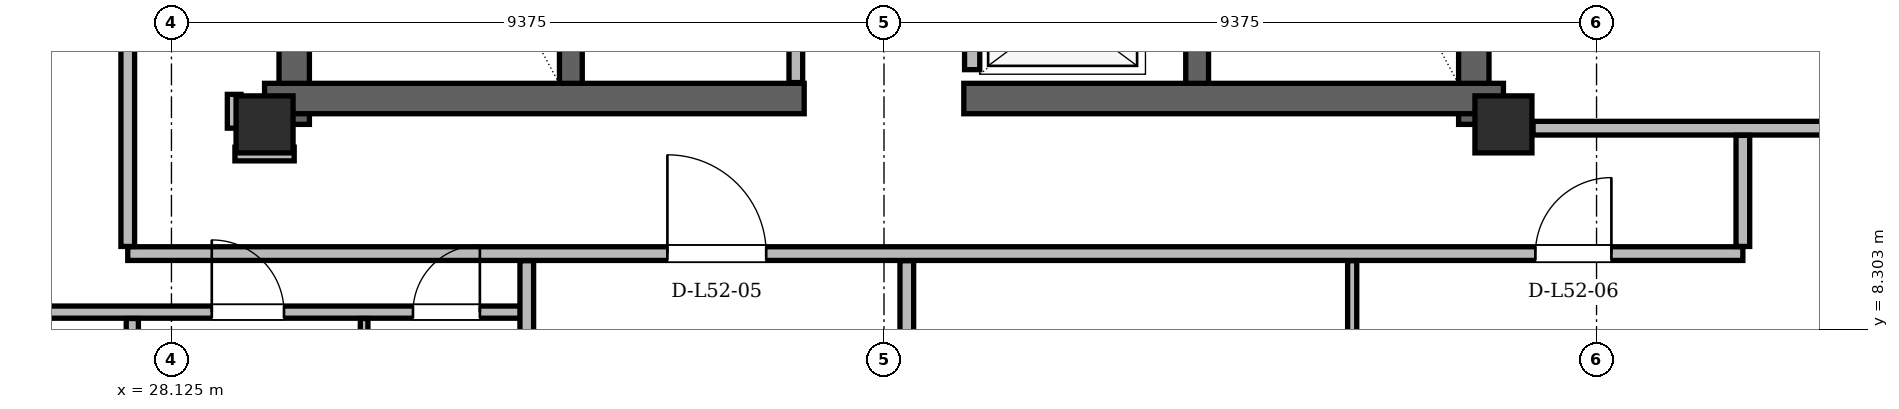
"""IFC4 building model, lengths in metres.
Left out: names, types, materials, properties, quantities, classifications, styles, units other than length and angle.
Written with IfcOpenShell. Run it as: python <this file> out.ifc"""

import sys

from ifc_helpers import new_model, si_unit, direction, frame, frame_2d, origin, origin_2d, place, context, subcontext, project, spatial, rectangle, hollow_rectangle, extrude, element, fill, save


model = new_model("IFC4")
c1 = context("Model", 3, precision=1e-05, world=origin(), true_north=direction((0.0, 1.0)))
c2 = subcontext(c1, "Body", "Model", "MODEL_VIEW")
j1 = project(units=[si_unit("LENGTHUNIT", "METRE"), si_unit("PLANEANGLEUNIT", "RADIAN")], contexts=[c1])
p1 = place(None, origin())
s1 = spatial("IfcSite", under=j1, at=p1, CompositionType="ELEMENT")
p2 = place(p1, origin())
s2 = spatial("IfcBuilding", under=s1, at=p2, CompositionType="ELEMENT")
p3 = place(p2, frame((0.0, 0.0, 197.4)))
s3 = spatial("IfcBuildingStorey", under=s2, at=p3, CompositionType="ELEMENT", Elevation=197.4)
for number, where, z_axis, x_axis in (
    (1, (29.35, 11.0, 0.0), (0.0, 0.0, 1.0), (1.0, 0.0, 0.0)),
    (2, (45.65, 11.0, 0.0), (0.0, 0.0, 1.0), (1.0, 0.0, 0.0)),
):
    element("IfcColumn", number, at=place(p3, frame(where, z_axis=z_axis, x_axis=x_axis)), inside=s3, PredefinedType="COLUMN", context=c2, shape_type="SweptSolid", body=[
        extrude(hollow_rectangle(XDim=0.75, YDim=0.75, WallThickness=0.06, at=origin_2d()), origin(), (0.0, 0.0, 1.0), 3.6),
    ])
for number, where, z_axis, x_axis in (
    (3, (29.74, 11.0, 0.0), (0.0, 0.0, 1.0), (0.0, 1.0, 0.0)),
    (4, (45.26, 11.0, 0.0), (0.0, 0.0, 1.0), (0.0, 1.0, 0.0)),
):
    element("IfcWall", number, at=place(p3, frame(where, z_axis=z_axis, x_axis=x_axis)), inside=s3, PredefinedType="SHEAR", context=c2, shape_type="SweptSolid", body=[
        extrude(rectangle(XDim=13.3, YDim=0.4, at=frame_2d((6.65, 0.0))), origin(), (0.0, 0.0, 1.0), 3.38),
    ])
for number, where, z_axis, x_axis in (
    (5, (29.35, 11.34, 0.0), (0.0, 0.0, 1.0), (1.0, 0.0, 0.0)),
    (6, (38.55, 11.34, 0.0), (0.0, 0.0, 1.0), (1.0, 0.0, 0.0)),
):
    element("IfcWall", number, at=place(p3, frame(where, z_axis=z_axis, x_axis=x_axis)), inside=s3, PredefinedType="SHEAR", context=c2, shape_type="SweptSolid", body=[
        extrude(rectangle(XDim=7.1, YDim=0.4, at=frame_2d((3.55, 0.0))), origin(), (0.0, 0.0, 1.0), 3.38),
    ])
for number, where, z_axis, x_axis in (
    (7, (33.38, 11.54, 0.0), (0.0, 0.0, 1.0), (0.0, 1.0, 0.0)),
    (8, (41.62, 11.54, 0.0), (0.0, 0.0, 1.0), (0.0, 1.0, 0.0)),
):
    element("IfcWall", number, at=place(p3, frame(where, z_axis=z_axis, x_axis=x_axis)), inside=s3, PredefinedType="SHEAR", context=c2, shape_type="SweptSolid", body=[
        extrude(rectangle(XDim=7.62, YDim=0.3, at=frame_2d((3.81, 0.0))), origin(), (0.0, 0.0, 1.0), 3.38),
    ])
p4 = place(p3, frame((33.766, 43.21, 0.0), z_axis=(0.0, 0.0, 1.0), x_axis=(-0.499998847915, -0.86602606894, 0.0)))
e9 = element("IfcWall", 9, at=p4, inside=s3, PredefinedType="SOLIDWALL", context=c2, shape_type="SweptSolid", body=[
    extrude(rectangle(XDim=36.293, YDim=0.29, at=frame_2d((18.147, 0.0))), origin(), (0.0, 0.0, 1.0), 2.677),
])
p5 = place(p4, frame((8.034, 0.0, 0.0)))
e10 = element("IfcOpeningElement", 10, at=p5, cuts=e9, PredefinedType="OPENING", context=c2, shape_type="SweptSolid", body=[
    extrude(rectangle(XDim=1.5, YDim=2.2, at=frame_2d((0.75, 1.1))), frame((0.0, 0.145, 0.0), z_axis=(0.0, -1.0, 0.0), x_axis=(1.0, 0.0, 0.0)), (0.0, 0.0, 1.0), 0.29),
])
p6 = place(p4, frame((28.214, 0.0, 0.0)))
e11 = element("IfcOpeningElement", 11, at=p6, cuts=e9, PredefinedType="OPENING", context=c2, shape_type="SweptSolid", body=[
    extrude(rectangle(XDim=1.5, YDim=2.2, at=frame_2d((0.75, 1.1))), frame((0.0, 0.145, 0.0), z_axis=(0.0, -1.0, 0.0), x_axis=(1.0, 0.0, 0.0)), (0.0, 0.0, 1.0), 0.29),
])
p7 = place(p4, frame((32.772, 0.0, 0.85)))
e12 = element("IfcOpeningElement", 12, at=p7, cuts=e9, PredefinedType="OPENING", context=c2, shape_type="SweptSolid", body=[
    extrude(rectangle(XDim=2.4, YDim=1.717, at=frame_2d((1.2, 0.858))), frame((0.0, 0.145, 0.0), z_axis=(0.0, -1.0, 0.0), x_axis=(1.0, 0.0, 0.0)), (0.0, 0.0, 1.0), 0.29),
])
p8 = place(p4, frame((21.96, 0.0, 0.85)))
e13 = element("IfcOpeningElement", 13, at=p8, cuts=e9, PredefinedType="OPENING", context=c2, shape_type="SweptSolid", body=[
    extrude(rectangle(XDim=2.0, YDim=1.717, at=frame_2d((1.0, 0.858))), frame((0.0, 0.145, 0.0), z_axis=(0.0, -1.0, 0.0), x_axis=(1.0, 0.0, 0.0)), (0.0, 0.0, 1.0), 0.29),
])
p9 = place(p4, frame((2.382, 0.0, 0.85)))
e14 = element("IfcOpeningElement", 14, at=p9, cuts=e9, PredefinedType="OPENING", context=c2, shape_type="SweptSolid", body=[
    extrude(rectangle(XDim=1.6, YDim=1.7, at=frame_2d((0.8, 0.85))), frame((0.0, 0.145, 0.0), z_axis=(0.0, -1.0, 0.0), x_axis=(1.0, 0.0, 0.0)), (0.0, 0.0, 1.0), 0.29),
])
p10 = place(p4, frame((13.34, 0.0, 0.85)))
e15 = element("IfcOpeningElement", 15, at=p10, cuts=e9, PredefinedType="OPENING", context=c2, shape_type="SweptSolid", body=[
    extrude(rectangle(XDim=3.0, YDim=1.717, at=frame_2d((1.5, 0.858))), frame((0.0, 0.145, 0.0), z_axis=(0.0, -1.0, 0.0), x_axis=(1.0, 0.0, 0.0)), (0.0, 0.0, 1.0), 0.29),
])
p11 = place(p3, frame((36.34, 11.55, 0.0), z_axis=(0.0, 0.0, 1.0), x_axis=(0.0, 1.0, 0.0)))
e16 = element("IfcWall", 16, at=p11, inside=s3, PredefinedType="PARTITIONING", context=c2, shape_type="SweptSolid", body=[
    extrude(rectangle(XDim=5.55, YDim=0.18, at=frame_2d((2.775, 0.0))), origin(), (0.0, 0.0, 1.0), 3.38),
])
p12 = place(p11, frame((2.85, 0.0, 0.0)))
e17 = element("IfcOpeningElement", 17, at=p12, cuts=e16, PredefinedType="OPENING", context=c2, shape_type="SweptSolid", body=[
    extrude(rectangle(XDim=0.95, YDim=2.1, at=frame_2d((0.475, 1.05))), frame((0.0, 0.09, 0.0), z_axis=(0.0, -1.0, 0.0), x_axis=(1.0, 0.0, 0.0)), (0.0, 0.0, 1.0), 0.18),
])
p13 = place(p3, frame((38.66, 11.72, 0.0), z_axis=(0.0, 0.0, 1.0), x_axis=(0.0, 1.0, 0.0)))
e18 = element("IfcWall", 18, at=p13, inside=s3, PredefinedType="PARTITIONING", context=c2, shape_type="SweptSolid", body=[
    extrude(rectangle(XDim=9.1, YDim=0.2, at=frame_2d((4.55, 0.0))), origin(), (0.0, 0.0, 1.0), 3.38),
])
p14 = place(p13, frame((0.255, 0.0, 0.0)))
e19 = element("IfcOpeningElement", 19, at=p14, cuts=e18, PredefinedType="OPENING", context=c2, shape_type="SweptSolid", body=[
    extrude(rectangle(XDim=1.05, YDim=2.15, at=frame_2d((0.525, 1.075))), frame((0.0, 0.1, 0.0), z_axis=(0.0, -1.0, 0.0), x_axis=(1.0, 0.0, 0.0)), (0.0, 0.0, 1.0), 0.2),
])
p15 = place(p13, frame((2.105, 0.0, 0.0)))
e20 = element("IfcOpeningElement", 20, at=p15, cuts=e18, PredefinedType="OPENING", context=c2, shape_type="SweptSolid", body=[
    extrude(rectangle(XDim=1.05, YDim=2.15, at=frame_2d((0.525, 1.075))), frame((0.0, 0.1, 0.0), z_axis=(0.0, -1.0, 0.0), x_axis=(1.0, 0.0, 0.0)), (0.0, 0.0, 1.0), 0.2),
])
p16 = place(p13, frame((3.955, 0.0, 0.0)))
e21 = element("IfcOpeningElement", 21, at=p16, cuts=e18, PredefinedType="OPENING", context=c2, shape_type="SweptSolid", body=[
    extrude(rectangle(XDim=1.05, YDim=2.15, at=frame_2d((0.525, 1.075))), frame((0.0, 0.1, 0.0), z_axis=(0.0, -1.0, 0.0), x_axis=(1.0, 0.0, 0.0)), (0.0, 0.0, 1.0), 0.2),
])
p17 = place(p3, frame((17.667, 8.53, 0.0), z_axis=(0.0, 0.0, 1.0), x_axis=(1.0, 0.0, 0.0)))
e22 = element("IfcWall", 22, at=p17, inside=s3, PredefinedType="PARTITIONING", context=c2, shape_type="SweptSolid", body=[
    extrude(rectangle(XDim=15.183, YDim=0.16, at=frame_2d((7.592, 0.0))), origin(), (0.0, 0.0, 1.0), 2.913),
])
p18 = place(p17, frame((2.401, 0.0, 0.0)))
e23 = element("IfcOpeningElement", 23, at=p18, cuts=e22, PredefinedType="OPENING", context=c2, shape_type="SweptSolid", body=[
    extrude(rectangle(XDim=0.92, YDim=2.12, at=frame_2d((0.46, 1.06))), frame((0.0, 0.08, 0.0), z_axis=(0.0, -1.0, 0.0), x_axis=(1.0, 0.0, 0.0)), (0.0, 0.0, 1.0), 0.16),
])
p19 = place(p17, frame((7.37, 0.0, 0.0)))
e24 = element("IfcOpeningElement", 24, at=p19, cuts=e22, PredefinedType="OPENING", context=c2, shape_type="SweptSolid", body=[
    extrude(rectangle(XDim=0.95, YDim=2.1, at=frame_2d((0.475, 1.05))), frame((0.0, 0.08, 0.0), z_axis=(0.0, -1.0, 0.0), x_axis=(1.0, 0.0, 0.0)), (0.0, 0.0, 1.0), 0.16),
])
p20 = place(p17, frame((10.988, 0.0, 0.0)))
e25 = element("IfcOpeningElement", 25, at=p20, cuts=e22, PredefinedType="OPENING", context=c2, shape_type="SweptSolid", body=[
    extrude(rectangle(XDim=0.95, YDim=2.1, at=frame_2d((0.475, 1.05))), frame((0.0, 0.08, 0.0), z_axis=(0.0, -1.0, 0.0), x_axis=(1.0, 0.0, 0.0)), (0.0, 0.0, 1.0), 0.16),
])
p21 = place(p17, frame((13.636, 0.0, 0.0)))
e26 = element("IfcOpeningElement", 26, at=p21, cuts=e22, PredefinedType="OPENING", context=c2, shape_type="SweptSolid", body=[
    extrude(rectangle(XDim=0.88, YDim=2.08, at=frame_2d((0.44, 1.04))), frame((0.0, 0.08, 0.0), z_axis=(0.0, -1.0, 0.0), x_axis=(1.0, 0.0, 0.0)), (0.0, 0.0, 1.0), 0.16),
])
p22 = place(p3, frame((27.55, 9.3, 0.0), z_axis=(0.0, 0.0, 1.0), x_axis=(1.0, 0.0, 0.0)))
e27 = element("IfcWall", 27, at=p22, inside=s3, PredefinedType="PARTITIONING", context=c2, shape_type="SweptSolid", body=[
    extrude(rectangle(XDim=21.25, YDim=0.18, at=frame_2d((10.625, 0.0))), origin(), (0.0, 0.0, 1.0), 2.913),
])
p23 = place(p22, frame((7.1, 0.0, 0.0)))
e28 = element("IfcOpeningElement", 28, at=p23, cuts=e27, PredefinedType="OPENING", context=c2, shape_type="SweptSolid", body=[
    extrude(rectangle(XDim=1.3, YDim=2.2, at=frame_2d((0.65, 1.1))), frame((0.0, 0.09, 0.0), z_axis=(0.0, -1.0, 0.0), x_axis=(1.0, 0.0, 0.0)), (0.0, 0.0, 1.0), 0.18),
])
p24 = place(p22, frame((18.52, 0.0, 0.0)))
e29 = element("IfcOpeningElement", 29, at=p24, cuts=e27, PredefinedType="OPENING", context=c2, shape_type="SweptSolid", body=[
    extrude(rectangle(XDim=1.0, YDim=2.18, at=frame_2d((0.5, 1.09))), frame((0.0, 0.09, 0.0), z_axis=(0.0, -1.0, 0.0), x_axis=(1.0, 0.0, 0.0)), (0.0, 0.0, 1.0), 0.18),
])
p25 = place(p3, frame((28.96, 10.61, 0.0), z_axis=(0.0, 0.0, 1.0), x_axis=(1.0, 0.0, 0.0)))
e30 = element("IfcWall", 30, at=p25, inside=s3, PredefinedType="PARTITIONING", context=c2, shape_type="SweptSolid", body=[
    extrude(rectangle(XDim=0.78, YDim=0.18, at=frame_2d((0.39, 0.0))), origin(), (0.0, 0.0, 1.0), 3.38),
])
p26 = place(p3, frame((46.04, 10.95, 0.0), z_axis=(0.0, 0.0, 1.0), x_axis=(1.0, 0.0, 0.0)))
e31 = element("IfcWall", 31, at=p26, inside=s3, PredefinedType="PARTITIONING", context=c2, shape_type="SweptSolid", body=[
    extrude(rectangle(XDim=12.69, YDim=0.18, at=frame_2d((6.345, 0.0))), origin(), (0.0, 0.0, 1.0), 2.913),
])
p27 = place(p3, frame((27.55, 9.394, 0.0), z_axis=(0.0, 0.0, 1.0), x_axis=(0.0, 1.0, 0.0)))
e32 = element("IfcWall", 32, at=p27, inside=s3, PredefinedType="PARTITIONING", context=c2, shape_type="SweptSolid", body=[
    extrude(rectangle(XDim=7.312, YDim=0.18, at=frame_2d((3.656, 0.0))), origin(), (0.0, 0.0, 1.0), 2.913),
])
p28 = place(p27, frame((3.927, 0.0, 0.0)))
e33 = element("IfcOpeningElement", 33, at=p28, cuts=e32, PredefinedType="OPENING", context=c2, shape_type="SweptSolid", body=[
    extrude(rectangle(XDim=1.0, YDim=2.18, at=frame_2d((0.5, 1.09))), frame((0.0, 0.09, 0.0), z_axis=(0.0, -1.0, 0.0), x_axis=(1.0, 0.0, 0.0)), (0.0, 0.0, 1.0), 0.18),
])
p29 = place(p3, frame((27.61, 5.46, 0.0), z_axis=(0.0, 0.0, 1.0), x_axis=(0.0, 1.0, 0.0)))
e34 = element("IfcWall", 34, at=p29, inside=s3, PredefinedType="PARTITIONING", context=c2, shape_type="SweptSolid", body=[
    extrude(rectangle(XDim=2.986, YDim=0.16, at=frame_2d((1.493, 0.0))), origin(), (0.0, 0.0, 1.0), 2.966),
])
p30 = place(p3, frame((28.95, 10.95, 0.0), z_axis=(0.0, 0.0, 1.0), x_axis=(0.0, 1.0, 0.0)))
e35 = element("IfcWall", 35, at=p30, inside=s3, PredefinedType="PARTITIONING", context=c2, shape_type="SweptSolid", body=[
    extrude(rectangle(XDim=0.445, YDim=0.18, at=frame_2d((0.223, 0.0))), origin(), (0.0, 0.0, 1.0), 2.913),
])
p31 = place(p3, frame((30.66, 5.46, 0.0), z_axis=(0.0, 0.0, 1.0), x_axis=(0.0, 1.0, 0.0)))
e36 = element("IfcWall", 36, at=p31, inside=s3, PredefinedType="PARTITIONING", context=c2, shape_type="SweptSolid", body=[
    extrude(rectangle(XDim=2.986, YDim=0.1, at=frame_2d((1.493, 0.0))), origin(), (0.0, 0.0, 1.0), 2.966),
])
p32 = place(p3, frame((32.8, 5.46, 0.0), z_axis=(0.0, 0.0, 1.0), x_axis=(0.0, 1.0, 0.0)))
e37 = element("IfcWall", 37, at=p32, inside=s3, PredefinedType="PARTITIONING", context=c2, shape_type="SweptSolid", body=[
    extrude(rectangle(XDim=3.746, YDim=0.18, at=frame_2d((1.873, 0.0))), origin(), (0.0, 0.0, 1.0), 2.966),
])
p33 = place(p3, frame((37.8, 5.406, 0.0), z_axis=(0.0, 0.0, 1.0), x_axis=(0.0, 1.0, 0.0)))
e38 = element("IfcWall", 38, at=p33, inside=s3, PredefinedType="PARTITIONING", context=c2, shape_type="SweptSolid", body=[
    extrude(rectangle(XDim=3.801, YDim=0.18, at=frame_2d((1.9, 0.0))), origin(), (0.0, 0.0, 1.0), 3.38),
])
p34 = place(p3, frame((43.66, 5.46, 0.0), z_axis=(0.0, 0.0, 1.0), x_axis=(0.0, 1.0, 0.0)))
e39 = element("IfcWall", 39, at=p34, inside=s3, PredefinedType="PARTITIONING", context=c2, shape_type="SweptSolid", body=[
    extrude(rectangle(XDim=3.746, YDim=0.12, at=frame_2d((1.873, 0.0))), origin(), (0.0, 0.0, 1.0), 3.38),
])
p35 = place(p34, frame((1.48, 0.0, 0.0)))
e40 = element("IfcOpeningElement", 40, at=p35, cuts=e39, PredefinedType="OPENING", context=c2, shape_type="SweptSolid", body=[
    extrude(rectangle(XDim=0.88, YDim=2.08, at=frame_2d((0.44, 1.04))), frame((0.0, 0.06, 0.0), z_axis=(0.0, -1.0, 0.0), x_axis=(1.0, 0.0, 0.0)), (0.0, 0.0, 1.0), 0.12),
])
p36 = place(p3, frame((48.8, 9.394, 0.0), z_axis=(0.0, 0.0, 1.0), x_axis=(0.0, 1.0, 0.0)))
e41 = element("IfcWall", 41, at=p36, inside=s3, PredefinedType="PARTITIONING", context=c2, shape_type="SweptSolid", body=[
    extrude(rectangle(XDim=1.462, YDim=0.18, at=frame_2d((0.731, 0.0))), origin(), (0.0, 0.0, 1.0), 3.38),
])
p37 = place(p20, origin())
e42 = element("IfcDoor", 42, at=p37, inside=s3, OperationType="SINGLE_SWING_LEFT", PredefinedType="DOOR", context=c2, shape_type="SweptSolid", body=[
    extrude(rectangle(XDim=0.95, YDim=2.1, at=frame_2d((0.475, 1.05))), frame((0.0, 0.025, 0.0), z_axis=(0.0, -1.0, 0.0), x_axis=(1.0, 0.0, 0.0)), (0.0, 0.0, 1.0), 0.05),
])
fill(e25, e42)
p38 = place(p21, origin())
e43 = element("IfcDoor", 43, at=p38, inside=s3, OperationType="SINGLE_SWING_RIGHT", PredefinedType="DOOR", context=c2, shape_type="SweptSolid", body=[
    extrude(rectangle(XDim=0.88, YDim=2.08, at=frame_2d((0.44, 1.04))), frame((0.0, 0.025, 0.0), z_axis=(0.0, -1.0, 0.0), x_axis=(1.0, 0.0, 0.0)), (0.0, 0.0, 1.0), 0.05),
])
fill(e26, e43)
p39 = place(p23, origin())
e44 = element("IfcDoor", 44, at=p39, inside=s3, OperationType="SINGLE_SWING_LEFT", PredefinedType="DOOR", context=c2, shape_type="SweptSolid", body=[
    extrude(rectangle(XDim=1.3, YDim=2.2, at=frame_2d((0.65, 1.1))), frame((0.0, 0.025, 0.0), z_axis=(0.0, -1.0, 0.0), x_axis=(1.0, 0.0, 0.0)), (0.0, 0.0, 1.0), 0.05),
])
fill(e28, e44)
p40 = place(p24, origin())
e45 = element("IfcDoor", 45, at=p40, inside=s3, OperationType="SINGLE_SWING_RIGHT", PredefinedType="DOOR", context=c2, shape_type="SweptSolid", body=[
    extrude(rectangle(XDim=1.0, YDim=2.18, at=frame_2d((0.5, 1.09))), frame((0.0, 0.025, 0.0), z_axis=(0.0, -1.0, 0.0), x_axis=(1.0, 0.0, 0.0)), (0.0, 0.0, 1.0), 0.05),
])
fill(e29, e45)
save(model, sys.argv[1])
